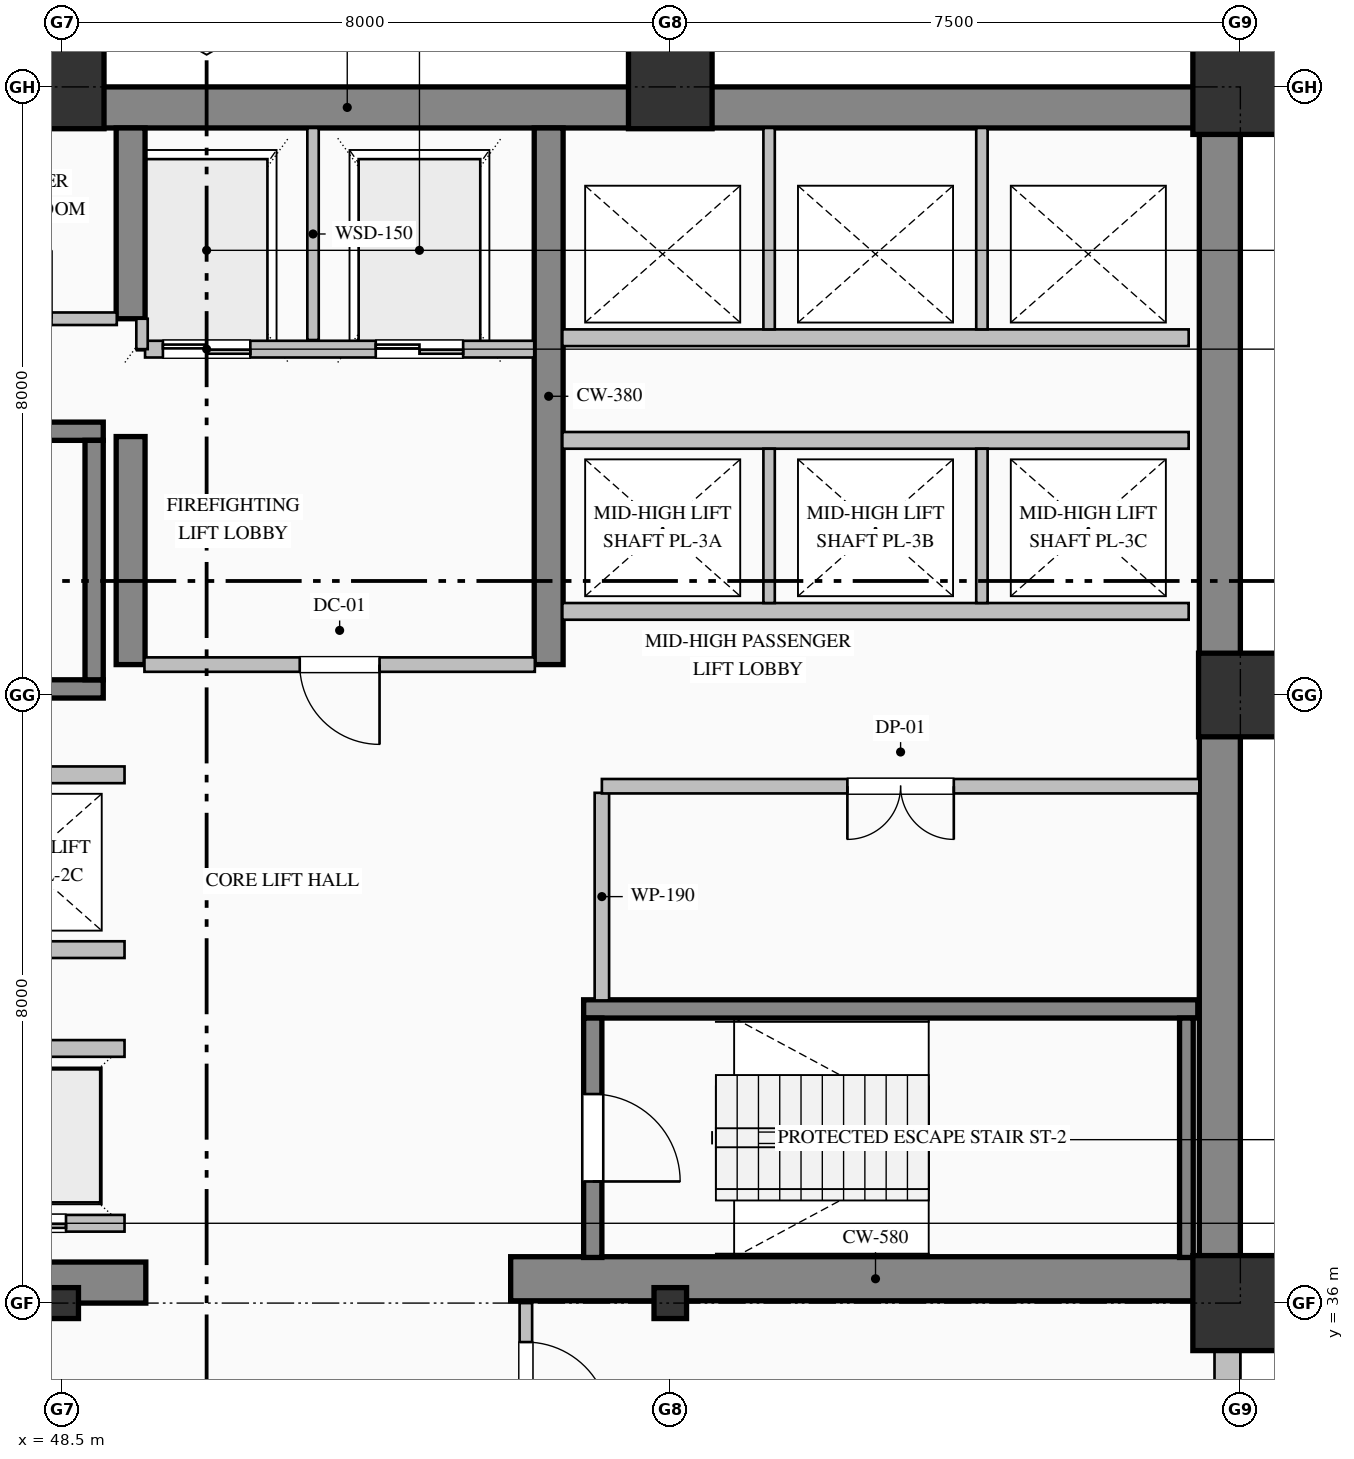
"""IFC4 building model, lengths in metres.
Left out: names, types, materials, properties, quantities, classifications, styles, units other than length and angle.
Written with IfcOpenShell. Run it as: python <this file> out.ifc"""

import sys

from ifc_helpers import new_model, si_unit, direction, frame, frame_2d, origin, origin_2d, place, context, subcontext, project, spatial, rectangle, hollow_rectangle, i_section, extrude, element, fill, save


model = new_model("IFC4")
c1 = context("Model", 3, precision=1e-05, world=origin(), true_north=direction((0.0, 1.0)))
c2 = subcontext(c1, "Body", "Model", "MODEL_VIEW")
j1 = project(units=[si_unit("LENGTHUNIT", "METRE"), si_unit("PLANEANGLEUNIT", "RADIAN")], contexts=[c1])
p1 = place(None, origin())
s1 = spatial("IfcSite", under=j1, at=p1, CompositionType="ELEMENT")
p2 = place(p1, origin())
s2 = spatial("IfcBuilding", under=s1, at=p2, CompositionType="ELEMENT")
p3 = place(p2, frame((0.0, 0.0, 40.2)))
s3 = spatial("IfcBuildingStorey", under=s2, at=p3, CompositionType="ELEMENT", Elevation=40.2)
p4 = place(p3, frame((40.5, 51.73, 0.0), z_axis=(0.0, 0.0, 1.0), x_axis=(1.0, 0.0, 0.0)))
e1 = element("IfcWall", 1, at=p4, inside=s3, PredefinedType="SHEAR", context=c2, shape_type="SweptSolid", body=[
    extrude(rectangle(XDim=23.5, YDim=0.54, at=frame_2d((11.75, 0.0))), origin(), (0.0, 0.0, 1.0), 3.75),
])
p5 = place(p3, frame((63.73, 36.32, 0.0), z_axis=(0.0, 0.0, 1.0), x_axis=(0.0, 1.0, 0.0)))
e2 = element("IfcWall", 2, at=p5, inside=s3, PredefinedType="SHEAR", context=c2, shape_type="SweptSolid", body=[
    extrude(rectangle(XDim=15.14, YDim=0.54, at=frame_2d((7.57, 0.0))), origin(), (0.0, 0.0, 1.0), 3.75),
])
p6 = place(p3, frame((48.2, 36.27, 0.0), z_axis=(0.0, 0.0, 1.0), x_axis=(1.0, 0.0, 0.0)))
e3 = element("IfcWall", 3, at=p6, inside=s3, PredefinedType="SHEAR", context=c2, shape_type="SweptSolid", body=[
    extrude(rectangle(XDim=1.4, YDim=0.54, at=frame_2d((0.7, 0.0))), origin(), (0.0, 0.0, 1.0), 3.75),
])
p7 = place(p3, frame((54.4, 36.32, 0.0), z_axis=(0.0, 0.0, 1.0), x_axis=(1.0, 0.0, 0.0)))
e4 = element("IfcWall", 4, at=p7, inside=s3, PredefinedType="SHEAR", context=c2, shape_type="SweptSolid", body=[
    extrude(rectangle(XDim=9.6, YDim=0.58, at=frame_2d((4.8, 0.0))), origin(), (0.0, 0.0, 1.0), 4.0),
])
p8 = place(p3, frame((49.4, 44.4, 0.0), z_axis=(0.0, 0.0, 1.0), x_axis=(0.0, 1.0, 0.0)))
e5 = element("IfcWall", 5, at=p8, inside=s3, PredefinedType="SHEAR", context=c2, shape_type="SweptSolid", body=[
    extrude(rectangle(XDim=3.0, YDim=0.38, at=frame_2d((1.5, 0.0))), origin(), (0.0, 0.0, 1.0), 3.75),
])
p9 = place(p3, frame((49.4, 48.95, 0.0), z_axis=(0.0, 0.0, 1.0), x_axis=(0.0, 1.0, 0.0)))
e6 = element("IfcWall", 6, at=p9, inside=s3, PredefinedType="SHEAR", context=c2, shape_type="SweptSolid", body=[
    extrude(rectangle(XDim=2.51, YDim=0.38, at=frame_2d((1.255, 0.0))), origin(), (0.0, 0.0, 1.0), 3.75),
])
p10 = place(p3, frame((54.9, 44.4, 0.0), z_axis=(0.0, 0.0, 1.0), x_axis=(0.0, 1.0, 0.0)))
e7 = element("IfcWall", 7, at=p10, inside=s3, PredefinedType="SHEAR", context=c2, shape_type="SweptSolid", body=[
    extrude(rectangle(XDim=7.06, YDim=0.38, at=frame_2d((3.53, 0.0))), origin(), (0.0, 0.0, 1.0), 3.75),
])
p11 = place(p3, frame((48.5, 36.0, 0.0), z_axis=(0.0, 0.0, 1.0), x_axis=(1.0, 0.0, 0.0)))
e8 = element("IfcColumn", 8, at=p11, inside=s3, PredefinedType="COLUMN", context=c2, shape_type="SweptSolid", body=[
    extrude(i_section(OverallWidth=0.407, OverallDepth=0.428, WebThickness=0.02, FlangeThickness=0.035, FilletRadius=0.022, at=origin_2d()), origin(), (0.0, 0.0, 1.0), 4.0),
])
p12 = place(p3, frame((48.5, 52.0, 0.0), z_axis=(0.0, 0.0, 1.0), x_axis=(1.0, 0.0, 0.0)))
e9 = element("IfcColumn", 9, at=p12, inside=s3, PredefinedType="COLUMN", context=c2, shape_type="SweptSolid", body=[
    extrude(hollow_rectangle(XDim=1.1, YDim=1.1, WallThickness=0.04, at=origin_2d()), origin(), (0.0, 0.0, 1.0), 4.0),
])
p13 = place(p3, frame((56.5, 36.0, 0.0), z_axis=(0.0, 0.0, 1.0), x_axis=(1.0, 0.0, 0.0)))
e10 = element("IfcColumn", 10, at=p13, inside=s3, PredefinedType="COLUMN", context=c2, shape_type="SweptSolid", body=[
    extrude(i_section(OverallWidth=0.407, OverallDepth=0.428, WebThickness=0.02, FlangeThickness=0.035, FilletRadius=0.022, at=origin_2d()), origin(), (0.0, 0.0, 1.0), 4.0),
])
p14 = place(p3, frame((56.5, 52.0, 0.0), z_axis=(0.0, 0.0, 1.0), x_axis=(1.0, 0.0, 0.0)))
e11 = element("IfcColumn", 11, at=p14, inside=s3, PredefinedType="COLUMN", context=c2, shape_type="SweptSolid", body=[
    extrude(hollow_rectangle(XDim=1.1, YDim=1.1, WallThickness=0.04, at=origin_2d()), origin(), (0.0, 0.0, 1.0), 4.0),
])
p15 = place(p3, frame((64.0, 36.0, 0.0), z_axis=(0.0, 0.0, 1.0), x_axis=(1.0, 0.0, 0.0)))
e12 = element("IfcColumn", 12, at=p15, inside=s3, PredefinedType="COLUMN", context=c2, shape_type="SweptSolid", body=[
    extrude(hollow_rectangle(XDim=1.25, YDim=1.25, WallThickness=0.045, at=origin_2d()), origin(), (0.0, 0.0, 1.0), 4.0),
])
p16 = place(p3, frame((64.0, 44.0, 0.0), z_axis=(0.0, 0.0, 1.0), x_axis=(1.0, 0.0, 0.0)))
e13 = element("IfcColumn", 13, at=p16, inside=s3, PredefinedType="COLUMN", context=c2, shape_type="SweptSolid", body=[
    extrude(hollow_rectangle(XDim=1.1, YDim=1.1, WallThickness=0.04, at=origin_2d()), origin(), (0.0, 0.0, 1.0), 4.0),
])
p17 = place(p3, frame((64.0, 52.0, 0.0), z_axis=(0.0, 0.0, 1.0), x_axis=(1.0, 0.0, 0.0)))
e14 = element("IfcColumn", 14, at=p17, inside=s3, PredefinedType="COLUMN", context=c2, shape_type="SweptSolid", body=[
    extrude(hollow_rectangle(XDim=1.25, YDim=1.25, WallThickness=0.045, at=origin_2d()), origin(), (0.0, 0.0, 1.0), 4.0),
])
p18 = place(p3, frame((63.83, 36.05, 0.0), z_axis=(0.0, 0.0, 1.0), x_axis=(0.0, -1.0, 0.0)))
e15 = element("IfcWall", 15, at=p18, inside=s3, PredefinedType="SOLIDWALL", context=c2, shape_type="SweptSolid", body=[
    extrude(rectangle(XDim=28.05, YDim=0.34, at=frame_2d((14.025, 0.0))), origin(), (0.0, 0.0, 1.0), 3.25),
])
p19 = place(p18, frame((9.6, 0.0, 0.8)))
e16 = element("IfcOpeningElement", 16, at=p19, cuts=e15, PredefinedType="OPENING", context=c2, shape_type="SweptSolid", body=[
    extrude(rectangle(XDim=2.4, YDim=2.15, at=frame_2d((1.2, 1.075))), frame((0.0, 0.18, 0.0), z_axis=(0.0, -1.0, 0.0), x_axis=(1.0, 0.0, 0.0)), (0.0, 0.0, 1.0), 0.36),
])
p20 = place(p18, frame((13.5, 0.0, 0.85)))
e17 = element("IfcOpeningElement", 17, at=p20, cuts=e15, PredefinedType="OPENING", context=c2, shape_type="SweptSolid", body=[
    extrude(rectangle(XDim=1.8, YDim=2.05, at=frame_2d((0.9, 1.025))), frame((0.0, 0.18, 0.0), z_axis=(0.0, -1.0, 0.0), x_axis=(1.0, 0.0, 0.0)), (0.0, 0.0, 1.0), 0.36),
])
for number, where, z_axis, x_axis in (
    (18, (40.96, 47.47, 0.0), (0.0, 0.0, 1.0), (1.0, 0.0, 0.0)),
    (19, (49.04, 44.08, 0.0), (0.0, 0.0, 1.0), (-1.0, 0.0, 0.0)),
):
    element("IfcWall", number, at=place(p3, frame(where, z_axis=z_axis, x_axis=x_axis)), inside=s3, PredefinedType="SOLIDWALL", context=c2, shape_type="SweptSolid", body=[
        extrude(rectangle(XDim=8.08, YDim=0.24, at=frame_2d((4.04, 0.0))), origin(), (0.0, 0.0, 1.0), 4.0),
    ])
p21 = place(p3, frame((48.92, 44.2, 0.0), z_axis=(0.0, 0.0, 1.0), x_axis=(0.0, 1.0, 0.0)))
e20 = element("IfcWall", 20, at=p21, inside=s3, PredefinedType="SOLIDWALL", context=c2, shape_type="SweptSolid", body=[
    extrude(rectangle(XDim=3.15, YDim=0.24, at=frame_2d((1.575, 0.0))), origin(), (0.0, 0.0, 1.0), 4.0),
])
p22 = place(p3, frame((55.36, 39.87, 0.0), z_axis=(0.0, 0.0, 1.0), x_axis=(1.0, 0.0, 0.0)))
e21 = element("IfcWall", 21, at=p22, inside=s3, PredefinedType="SOLIDWALL", context=c2, shape_type="SweptSolid", body=[
    extrude(rectangle(XDim=8.08, YDim=0.24, at=frame_2d((4.04, 0.0))), origin(), (0.0, 0.0, 1.0), 4.0),
])
p23 = place(p3, frame((55.48, 39.75, 0.0), z_axis=(0.0, 0.0, 1.0), x_axis=(0.0, -1.0, 0.0)))
e22 = element("IfcWall", 22, at=p23, inside=s3, PredefinedType="SOLIDWALL", context=c2, shape_type="SweptSolid", body=[
    extrude(rectangle(XDim=3.15, YDim=0.24, at=frame_2d((1.575, 0.0))), origin(), (0.0, 0.0, 1.0), 4.0),
])
p24 = place(p23, frame((1.0, 0.0, 0.0)))
e23 = element("IfcOpeningElement", 23, at=p24, cuts=e22, PredefinedType="OPENING", context=c2, shape_type="SweptSolid", body=[
    extrude(rectangle(XDim=1.15, YDim=2.2, at=frame_2d((0.575, 1.1))), frame((0.0, 0.13, 0.0), z_axis=(0.0, -1.0, 0.0), x_axis=(1.0, 0.0, 0.0)), (0.0, 0.0, 1.0), 0.26),
])
p25 = place(p3, frame((63.29, 36.6, 0.0), z_axis=(0.0, 0.0, 1.0), x_axis=(0.0, 1.0, 0.0)))
e24 = element("IfcWall", 24, at=p25, inside=s3, PredefinedType="SOLIDWALL", context=c2, shape_type="SweptSolid", body=[
    extrude(rectangle(XDim=3.15, YDim=0.18, at=frame_2d((1.575, 0.0))), origin(), (0.0, 0.0, 1.0), 4.0),
])
p26 = place(p3, frame((54.71, 48.55, 0.0), z_axis=(0.0, 0.0, 1.0), x_axis=(-1.0, 0.0, 0.0)))
e25 = element("IfcWall", 25, at=p26, inside=s3, PredefinedType="PARTITIONING", context=c2, shape_type="SweptSolid", body=[
    extrude(rectangle(XDim=5.12, YDim=0.22, at=frame_2d((2.56, 0.0))), origin(), (0.0, 0.0, 1.0), 3.75),
])
p27 = place(p26, frame((3.735, 0.0, 0.0)))
e26 = element("IfcOpeningElement", 26, at=p27, cuts=e25, PredefinedType="OPENING", context=c2, shape_type="SweptSolid", body=[
    extrude(rectangle(XDim=1.15, YDim=2.2, at=frame_2d((0.575, 1.1))), frame((0.0, 0.12, 0.0), z_axis=(0.0, -1.0, 0.0), x_axis=(1.0, 0.0, 0.0)), (0.0, 0.0, 1.0), 0.24),
])
p28 = place(p26, frame((0.935, 0.0, 0.0)))
e27 = element("IfcOpeningElement", 27, at=p28, cuts=e25, PredefinedType="OPENING", context=c2, shape_type="SweptSolid", body=[
    extrude(rectangle(XDim=1.15, YDim=2.2, at=frame_2d((0.575, 1.1))), frame((0.0, 0.12, 0.0), z_axis=(0.0, -1.0, 0.0), x_axis=(1.0, 0.0, 0.0)), (0.0, 0.0, 1.0), 0.24),
])
p29 = place(p3, frame((51.8, 48.67, 0.0), z_axis=(0.0, 0.0, 1.0), x_axis=(0.0, 1.0, 0.0)))
e28 = element("IfcWall", 28, at=p29, inside=s3, PredefinedType="PARTITIONING", context=c2, shape_type="SweptSolid", body=[
    extrude(rectangle(XDim=2.79, YDim=0.15, at=frame_2d((1.395, 0.0))), origin(), (0.0, 0.0, 1.0), 3.75),
])
p30 = place(p3, frame((49.55, 48.55, 0.0), z_axis=(0.0, 0.0, 1.0), x_axis=(0.0, 1.0, 0.0)))
e29 = element("IfcWall", 29, at=p30, inside=s3, PredefinedType="PARTITIONING", context=c2, shape_type="SweptSolid", body=[
    extrude(rectangle(XDim=0.4, YDim=0.15, at=frame_2d((0.2, 0.0))), origin(), (0.0, 0.0, 1.0), 3.75),
])
p31 = place(p3, frame((49.32, 37.05, 0.0), z_axis=(0.0, 0.0, 1.0), x_axis=(-1.0, 0.0, 0.0)))
e30 = element("IfcWall", 30, at=p31, inside=s3, PredefinedType="PARTITIONING", context=c2, shape_type="SweptSolid", body=[
    extrude(rectangle(XDim=8.24, YDim=0.22, at=frame_2d((4.12, 0.0))), origin(), (0.0, 0.0, 1.0), 3.75),
])
p32 = place(p31, frame((6.37, 0.0, 0.0)))
e31 = element("IfcOpeningElement", 31, at=p32, cuts=e30, PredefinedType="OPENING", context=c2, shape_type="SweptSolid", body=[
    extrude(rectangle(XDim=1.1, YDim=2.2, at=frame_2d((0.55, 1.1))), frame((0.0, 0.12, 0.0), z_axis=(0.0, -1.0, 0.0), x_axis=(1.0, 0.0, 0.0)), (0.0, 0.0, 1.0), 0.24),
])
p33 = place(p31, frame((3.57, 0.0, 0.0)))
e32 = element("IfcOpeningElement", 32, at=p33, cuts=e30, PredefinedType="OPENING", context=c2, shape_type="SweptSolid", body=[
    extrude(rectangle(XDim=1.1, YDim=2.2, at=frame_2d((0.55, 1.1))), frame((0.0, 0.12, 0.0), z_axis=(0.0, -1.0, 0.0), x_axis=(1.0, 0.0, 0.0)), (0.0, 0.0, 1.0), 0.24),
])
p34 = place(p31, frame((0.77, 0.0, 0.0)))
e33 = element("IfcOpeningElement", 33, at=p34, cuts=e30, PredefinedType="OPENING", context=c2, shape_type="SweptSolid", body=[
    extrude(rectangle(XDim=1.1, YDim=2.2, at=frame_2d((0.55, 1.1))), frame((0.0, 0.12, 0.0), z_axis=(0.0, -1.0, 0.0), x_axis=(1.0, 0.0, 0.0)), (0.0, 0.0, 1.0), 0.24),
])
for number, where, z_axis, x_axis in (
    (34, (41.08, 39.35, 0.0), (0.0, 0.0, 1.0), (1.0, 0.0, 0.0)),
    (35, (49.32, 40.65, 0.0), (0.0, 0.0, 1.0), (-1.0, 0.0, 0.0)),
    (36, (41.08, 42.95, 0.0), (0.0, 0.0, 1.0), (1.0, 0.0, 0.0)),
    (37, (63.32, 45.1, 0.0), (0.0, 0.0, 1.0), (-1.0, 0.0, 0.0)),
    (38, (55.08, 47.35, 0.0), (0.0, 0.0, 1.0), (1.0, 0.0, 0.0)),
):
    element("IfcWall", number, at=place(p3, frame(where, z_axis=z_axis, x_axis=x_axis)), inside=s3, PredefinedType="PARTITIONING", context=c2, shape_type="SweptSolid", body=[
        extrude(rectangle(XDim=8.24, YDim=0.22, at=frame_2d((4.12, 0.0))), origin(), (0.0, 0.0, 1.0), 3.75),
    ])
for number, where, z_axis, x_axis in (
    (39, (57.8, 45.21, 0.0), (0.0, 0.0, 1.0), (0.0, 1.0, 0.0)),
    (40, (60.6, 45.21, 0.0), (0.0, 0.0, 1.0), (0.0, 1.0, 0.0)),
):
    element("IfcWall", number, at=place(p3, frame(where, z_axis=z_axis, x_axis=x_axis)), inside=s3, PredefinedType="PARTITIONING", context=c2, shape_type="SweptSolid", body=[
        extrude(rectangle(XDim=2.03, YDim=0.15, at=frame_2d((1.015, 0.0))), origin(), (0.0, 0.0, 1.0), 3.75),
    ])
p35 = place(p3, frame((63.32, 48.7, 0.0), z_axis=(0.0, 0.0, 1.0), x_axis=(-1.0, 0.0, 0.0)))
e41 = element("IfcWall", 41, at=p35, inside=s3, PredefinedType="PARTITIONING", context=c2, shape_type="SweptSolid", body=[
    extrude(rectangle(XDim=8.24, YDim=0.22, at=frame_2d((4.12, 0.0))), origin(), (0.0, 0.0, 1.0), 3.75),
])
for number, where, z_axis, x_axis in (
    (42, (57.8, 48.81, 0.0), (0.0, 0.0, 1.0), (0.0, 1.0, 0.0)),
    (43, (60.6, 48.81, 0.0), (0.0, 0.0, 1.0), (0.0, 1.0, 0.0)),
):
    element("IfcWall", number, at=place(p3, frame(where, z_axis=z_axis, x_axis=x_axis)), inside=s3, PredefinedType="PARTITIONING", context=c2, shape_type="SweptSolid", body=[
        extrude(rectangle(XDim=2.65, YDim=0.15, at=frame_2d((1.325, 0.0))), origin(), (0.0, 0.0, 1.0), 3.75),
    ])
p36 = place(p3, frame((46.6, 48.95, 0.0), z_axis=(0.0, 0.0, 1.0), x_axis=(1.0, 0.0, 0.0)))
e44 = element("IfcWall", 44, at=p36, inside=s3, PredefinedType="PARTITIONING", context=c2, shape_type="SweptSolid", body=[
    extrude(rectangle(XDim=2.618, YDim=0.165, at=frame_2d((1.309, 0.0))), origin(), (0.0, 0.0, 1.0), 3.75),
])
p37 = place(p36, frame((0.859, 0.0, 0.0)))
e45 = element("IfcOpeningElement", 45, at=p37, cuts=e44, PredefinedType="OPENING", context=c2, shape_type="SweptSolid", body=[
    extrude(rectangle(XDim=0.9, YDim=2.15, at=frame_2d((0.45, 1.075))), frame((0.0, 0.093, 0.0), z_axis=(0.0, -1.0, 0.0), x_axis=(1.0, 0.0, 0.0)), (0.0, 0.0, 1.0), 0.185),
])
p38 = place(p3, frame((54.718, 44.4, 0.0), z_axis=(0.0, 0.0, 1.0), x_axis=(-1.0, 0.0, 0.0)))
e46 = element("IfcWall", 46, at=p38, inside=s3, PredefinedType="PARTITIONING", context=c2, shape_type="SweptSolid", body=[
    extrude(rectangle(XDim=5.136, YDim=0.19, at=frame_2d((2.568, 0.0))), origin(), (0.0, 0.0, 1.0), 3.75),
])
p39 = place(p38, frame((2.043, 0.0, 0.0)))
e47 = element("IfcOpeningElement", 47, at=p39, cuts=e46, PredefinedType="OPENING", context=c2, shape_type="SweptSolid", body=[
    extrude(rectangle(XDim=1.05, YDim=2.15, at=frame_2d((0.525, 1.075))), frame((0.0, 0.105, 0.0), z_axis=(0.0, -1.0, 0.0), x_axis=(1.0, 0.0, 0.0)), (0.0, 0.0, 1.0), 0.21),
])
p40 = place(p3, frame((55.6, 42.713, 0.0), z_axis=(0.0, 0.0, 1.0), x_axis=(0.0, -1.0, 0.0)))
e48 = element("IfcWall", 48, at=p40, inside=s3, PredefinedType="PARTITIONING", context=c2, shape_type="SweptSolid", body=[
    extrude(rectangle(XDim=2.731, YDim=0.19, at=frame_2d((1.365, 0.0))), origin(), (0.0, 0.0, 1.0), 3.75),
])
p41 = place(p3, frame((63.46, 42.8, 0.0), z_axis=(0.0, 0.0, 1.0), x_axis=(-1.0, 0.0, 0.0)))
e49 = element("IfcWall", 49, at=p41, inside=s3, PredefinedType="PARTITIONING", context=c2, shape_type="SweptSolid", body=[
    extrude(rectangle(XDim=7.86, YDim=0.19, at=frame_2d((3.93, 0.0))), origin(), (0.0, 0.0, 1.0), 3.75),
])
p42 = place(p41, frame((3.23, 0.0, 0.0)))
e50 = element("IfcOpeningElement", 50, at=p42, cuts=e49, PredefinedType="OPENING", context=c2, shape_type="SweptSolid", body=[
    extrude(rectangle(XDim=1.4, YDim=2.25, at=frame_2d((0.7, 1.125))), frame((0.0, 0.105, 0.0), z_axis=(0.0, -1.0, 0.0), x_axis=(1.0, 0.0, 0.0)), (0.0, 0.0, 1.0), 0.21),
])
p43 = place(p3, frame((54.6, 36.0, 0.0), z_axis=(0.0, 0.0, 1.0), x_axis=(0.0, -1.0, 0.0)))
e51 = element("IfcWall", 51, at=p43, inside=s3, PredefinedType="PARTITIONING", context=c2, shape_type="SweptSolid", body=[
    extrude(rectangle(XDim=2.125, YDim=0.165, at=frame_2d((1.063, 0.0))), origin(), (0.0, 0.0, 1.0), 3.75),
])
p44 = place(p43, frame((0.513, 0.0, 0.0)))
e52 = element("IfcOpeningElement", 52, at=p44, cuts=e51, PredefinedType="OPENING", context=c2, shape_type="SweptSolid", body=[
    extrude(rectangle(XDim=1.1, YDim=2.2, at=frame_2d((0.55, 1.1))), frame((0.0, 0.093, 0.0), z_axis=(0.0, -1.0, 0.0), x_axis=(1.0, 0.0, 0.0)), (0.0, 0.0, 1.0), 0.185),
])
p45 = place(p24, origin())
e53 = element("IfcDoor", 53, at=p45, inside=s3, OperationType="SINGLE_SWING_RIGHT", PredefinedType="DOOR", context=c2, shape_type="SweptSolid", body=[
    extrude(rectangle(XDim=1.15, YDim=2.2, at=frame_2d((0.575, 1.1))), frame((0.0, 0.025, 0.0), z_axis=(0.0, -1.0, 0.0), x_axis=(1.0, 0.0, 0.0)), (0.0, 0.0, 1.0), 0.05),
])
fill(e23, e53)
p46 = place(p27, origin())
e54 = element("IfcDoor", 54, at=p46, inside=s3, OperationType="DOUBLE_DOOR_SLIDING", PredefinedType="DOOR", context=c2, shape_type="SweptSolid", body=[
    extrude(rectangle(XDim=1.15, YDim=2.2, at=frame_2d((0.575, 1.1))), frame((0.0, 0.025, 0.0), z_axis=(0.0, -1.0, 0.0), x_axis=(1.0, 0.0, 0.0)), (0.0, 0.0, 1.0), 0.05),
])
fill(e26, e54)
p47 = place(p28, origin())
e55 = element("IfcDoor", 55, at=p47, inside=s3, OperationType="DOUBLE_DOOR_SLIDING", PredefinedType="DOOR", context=c2, shape_type="SweptSolid", body=[
    extrude(rectangle(XDim=1.15, YDim=2.2, at=frame_2d((0.575, 1.1))), frame((0.0, 0.025, 0.0), z_axis=(0.0, -1.0, 0.0), x_axis=(1.0, 0.0, 0.0)), (0.0, 0.0, 1.0), 0.05),
])
fill(e27, e55)
p48 = place(p34, origin())
e56 = element("IfcDoor", 56, at=p48, inside=s3, OperationType="DOUBLE_DOOR_SLIDING", PredefinedType="DOOR", context=c2, shape_type="SweptSolid", body=[
    extrude(rectangle(XDim=1.1, YDim=2.2, at=frame_2d((0.55, 1.1))), frame((0.0, 0.025, 0.0), z_axis=(0.0, -1.0, 0.0), x_axis=(1.0, 0.0, 0.0)), (0.0, 0.0, 1.0), 0.05),
])
fill(e33, e56)
p49 = place(p39, origin())
e57 = element("IfcDoor", 57, at=p49, inside=s3, OperationType="SINGLE_SWING_LEFT", PredefinedType="DOOR", context=c2, shape_type="SweptSolid", body=[
    extrude(rectangle(XDim=1.05, YDim=2.15, at=frame_2d((0.525, 1.075))), frame((0.0, 0.025, 0.0), z_axis=(0.0, -1.0, 0.0), x_axis=(1.0, 0.0, 0.0)), (0.0, 0.0, 1.0), 0.05),
])
fill(e47, e57)
p50 = place(p42, origin())
e58 = element("IfcDoor", 58, at=p50, inside=s3, OperationType="DOUBLE_DOOR_SINGLE_SWING", PredefinedType="DOOR", context=c2, shape_type="SweptSolid", body=[
    extrude(rectangle(XDim=1.4, YDim=2.25, at=frame_2d((0.7, 1.125))), frame((0.0, 0.025, 0.0), z_axis=(0.0, -1.0, 0.0), x_axis=(1.0, 0.0, 0.0)), (0.0, 0.0, 1.0), 0.05),
])
fill(e50, e58)
p51 = place(p44, origin())
e59 = element("IfcDoor", 59, at=p51, inside=s3, OperationType="SINGLE_SWING_RIGHT", PredefinedType="DOOR", context=c2, shape_type="SweptSolid", body=[
    extrude(rectangle(XDim=1.1, YDim=2.2, at=frame_2d((0.55, 1.1))), frame((0.0, 0.025, 0.0), z_axis=(0.0, -1.0, 0.0), x_axis=(1.0, 0.0, 0.0)), (0.0, 0.0, 1.0), 0.05),
])
fill(e52, e59)
save(model, sys.argv[1])
